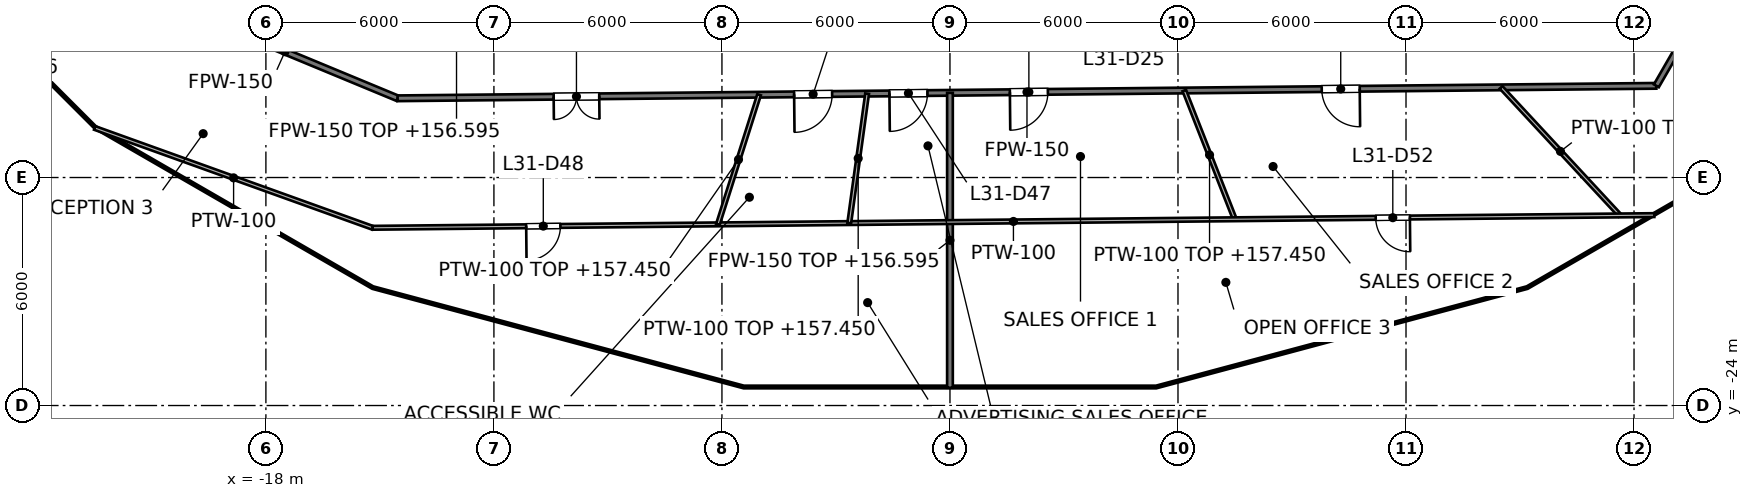
"""IFC4 building model, lengths in metres.
Left out: names, types, materials, properties, quantities, classifications, styles, units other than length and angle.
Written with IfcOpenShell. Run it as: python <this file> out.ifc"""

import sys

from ifc_helpers import new_model, si_unit, direction, frame, frame_2d, origin, place, context, subcontext, project, spatial, rectangle, extrude, element, fill, save


model = new_model("IFC4")
c1 = context("Model", 3, precision=1e-05, world=origin(), true_north=direction((0.0, 1.0)))
c2 = subcontext(c1, "Body", "Model", "MODEL_VIEW")
j1 = project(units=[si_unit("LENGTHUNIT", "METRE"), si_unit("PLANEANGLEUNIT", "RADIAN")], contexts=[c1])
p1 = place(None, origin())
s1 = spatial("IfcSite", under=j1, at=p1, CompositionType="ELEMENT")
p2 = place(p1, origin())
s2 = spatial("IfcBuilding", under=s1, at=p2, CompositionType="ELEMENT")
p3 = place(p2, frame((0.0, 0.0, 153.6)))
s3 = spatial("IfcBuildingStorey", under=s2, at=p3, CompositionType="ELEMENT", Elevation=153.6)
p4 = place(p3, frame((-20.46, -13.46, 0.0), z_axis=(0.0, 0.0, 1.0), x_axis=(0.923801547606, -0.382871650349, 0.0)))
e1 = element("IfcWall", 1, at=p4, inside=s3, PredefinedType="PARTITIONING", context=c2, shape_type="SweptSolid", body=[
    extrude(rectangle(XDim=6.415, YDim=0.15, at=frame_2d((3.208, 0.0))), origin(), (0.0, 0.0, 1.0), 2.927),
])
p5 = place(p3, frame((-14.534, -15.915, 0.0), z_axis=(0.0, 0.0, 1.0), x_axis=(0.999950930262, 0.009906415532, 0.0)))
e2 = element("IfcWall", 2, at=p5, inside=s3, PredefinedType="PARTITIONING", context=c2, shape_type="SweptSolid", body=[
    extrude(rectangle(XDim=33.123, YDim=0.15, at=frame_2d((16.561, 0.0))), origin(), (0.0, 0.0, 1.0), 2.927),
])
p6 = place(p5, frame((4.106, 0.0, 0.0)))
e3 = element("IfcOpeningElement", 3, at=p6, cuts=e2, PredefinedType="OPENING", context=c2, shape_type="SweptSolid", body=[
    extrude(rectangle(XDim=1.2, YDim=2.1, at=frame_2d((0.6, 1.05))), frame((0.0, 0.075, 0.0), z_axis=(0.0, -1.0, 0.0), x_axis=(1.0, 0.0, 0.0)), (0.0, 0.0, 1.0), 0.15),
])
p7 = place(p5, frame((10.434, 0.0, 0.0)))
e4 = element("IfcOpeningElement", 4, at=p7, cuts=e2, PredefinedType="OPENING", context=c2, shape_type="SweptSolid", body=[
    extrude(rectangle(XDim=1.0, YDim=2.1, at=frame_2d((0.5, 1.05))), frame((0.0, 0.075, 0.0), z_axis=(0.0, -1.0, 0.0), x_axis=(1.0, 0.0, 0.0)), (0.0, 0.0, 1.0), 0.15),
])
p8 = place(p5, frame((12.942, 0.0, 0.0)))
e5 = element("IfcOpeningElement", 5, at=p8, cuts=e2, PredefinedType="OPENING", context=c2, shape_type="SweptSolid", body=[
    extrude(rectangle(XDim=1.0, YDim=2.1, at=frame_2d((0.5, 1.05))), frame((0.0, 0.075, 0.0), z_axis=(0.0, -1.0, 0.0), x_axis=(1.0, 0.0, 0.0)), (0.0, 0.0, 1.0), 0.15),
])
p9 = place(p5, frame((16.111, 0.0, 0.0)))
e6 = element("IfcOpeningElement", 6, at=p9, cuts=e2, PredefinedType="OPENING", context=c2, shape_type="SweptSolid", body=[
    extrude(rectangle(XDim=1.0, YDim=2.1, at=frame_2d((0.5, 1.05))), frame((0.0, 0.075, 0.0), z_axis=(0.0, -1.0, 0.0), x_axis=(1.0, 0.0, 0.0)), (0.0, 0.0, 1.0), 0.15),
])
p10 = place(p5, frame((24.318, 0.0, 0.0)))
e7 = element("IfcOpeningElement", 7, at=p10, cuts=e2, PredefinedType="OPENING", context=c2, shape_type="SweptSolid", body=[
    extrude(rectangle(XDim=1.0, YDim=2.1, at=frame_2d((0.5, 1.05))), frame((0.0, 0.075, 0.0), z_axis=(0.0, -1.0, 0.0), x_axis=(1.0, 0.0, 0.0)), (0.0, 0.0, 1.0), 0.15),
])
p11 = place(p3, frame((18.587, -15.587, 0.0), z_axis=(0.0, 0.0, 1.0), x_axis=(0.500005419212, 0.866022274979, 0.0)))
e8 = element("IfcWall", 8, at=p11, inside=s3, PredefinedType="PARTITIONING", context=c2, shape_type="SweptSolid", body=[
    extrude(rectangle(XDim=8.713, YDim=0.15, at=frame_2d((4.357, 0.0))), origin(), (0.0, 0.0, 1.0), 2.927),
])
p12 = place(p11, frame((3.808, 0.0, 0.0)))
e9 = element("IfcOpeningElement", 9, at=p12, cuts=e8, PredefinedType="OPENING", context=c2, shape_type="SweptSolid", body=[
    extrude(rectangle(XDim=1.0, YDim=2.1, at=frame_2d((0.5, 1.05))), frame((0.0, 0.075, 0.0), z_axis=(0.0, -1.0, 0.0), x_axis=(1.0, 0.0, 0.0)), (0.0, 0.0, 1.0), 0.15),
])
p13 = place(p3, frame((0.0, -23.532, 0.0), z_axis=(0.0, 0.0, 1.0), x_axis=(0.0, 1.0, 0.0)))
e10 = element("IfcWall", 10, at=p13, inside=s3, PredefinedType="PARTITIONING", context=c2, shape_type="SweptSolid", body=[
    extrude(rectangle(XDim=7.76, YDim=0.15, at=frame_2d((3.88, 0.0))), origin(), (0.0, 0.0, 1.0), 2.995),
])
p14 = place(p3, frame((6.166, -15.711, 0.0), z_axis=(0.0, 0.0, 1.0), x_axis=(0.365297341245, -0.930890891823, 0.0)))
e11 = element("IfcWall", 11, at=p14, inside=s3, PredefinedType="PARTITIONING", context=c2, shape_type="SweptSolid", body=[
    extrude(rectangle(XDim=3.638, YDim=0.1, at=frame_2d((1.819, 0.0))), origin(), (0.0, 0.0, 1.0), 3.85),
])
p15 = place(p3, frame((14.501, -15.628, 0.0), z_axis=(0.0, 0.0, 1.0), x_axis=(0.680157643832, -0.73306587667, 0.0)))
e12 = element("IfcWall", 12, at=p15, inside=s3, PredefinedType="PARTITIONING", context=c2, shape_type="SweptSolid", body=[
    extrude(rectangle(XDim=4.596, YDim=0.1, at=frame_2d((2.298, 0.0))), origin(), (0.0, 0.0, 1.0), 3.85),
])
p16 = place(p3, frame((-22.506, -16.695, 0.0), z_axis=(0.0, 0.0, 1.0), x_axis=(0.941067528236, -0.338218727009, 0.0)))
e13 = element("IfcWall", 13, at=p16, inside=s3, PredefinedType="PARTITIONING", context=c2, shape_type="SweptSolid", body=[
    extrude(rectangle(XDim=7.77, YDim=0.1, at=frame_2d((3.885, 0.0))), origin(), (0.0, 0.0, 1.0), 2.927),
])
p17 = place(p3, frame((-15.194, -19.323, 0.0), z_axis=(0.0, 0.0, 1.0), x_axis=(0.999950976029, 0.009901794681, 0.0)))
e14 = element("IfcWall", 14, at=p17, inside=s3, PredefinedType="PARTITIONING", context=c2, shape_type="SweptSolid", body=[
    extrude(rectangle(XDim=33.73, YDim=0.1, at=frame_2d((16.865, 0.0))), origin(), (0.0, 0.0, 1.0), 2.927),
])
p18 = place(p17, frame((4.043, 0.0, 0.0)))
e15 = element("IfcOpeningElement", 15, at=p18, cuts=e14, PredefinedType="OPENING", context=c2, shape_type="SweptSolid", body=[
    extrude(rectangle(XDim=0.9, YDim=2.1, at=frame_2d((0.45, 1.05))), frame((0.0, 0.05, 0.0), z_axis=(0.0, -1.0, 0.0), x_axis=(1.0, 0.0, 0.0)), (0.0, 0.0, 1.0), 0.1),
])
p19 = place(p17, frame((26.398, 0.0, 0.0)))
e16 = element("IfcOpeningElement", 16, at=p19, cuts=e14, PredefinedType="OPENING", context=c2, shape_type="SweptSolid", body=[
    extrude(rectangle(XDim=0.9, YDim=2.1, at=frame_2d((0.45, 1.05))), frame((0.0, 0.05, 0.0), z_axis=(0.0, -1.0, 0.0), x_axis=(1.0, 0.0, 0.0)), (0.0, 0.0, 1.0), 0.1),
])
p20 = place(p3, frame((-6.106, -19.233, 0.0), z_axis=(0.0, 0.0, 1.0), x_axis=(0.302626350856, 0.95310927588, 0.0)))
e17 = element("IfcWall", 17, at=p20, inside=s3, PredefinedType="PARTITIONING", context=c2, shape_type="SweptSolid", body=[
    extrude(rectangle(XDim=3.579, YDim=0.1, at=frame_2d((1.789, 0.0))), origin(), (0.0, 0.0, 1.0), 3.85),
])
p21 = place(p3, frame((-2.65, -19.198, 0.0), z_axis=(0.0, 0.0, 1.0), x_axis=(0.136764815741, 0.990603545913, 0.0)))
e18 = element("IfcWall", 18, at=p21, inside=s3, PredefinedType="PARTITIONING", context=c2, shape_type="SweptSolid", body=[
    extrude(rectangle(XDim=3.436, YDim=0.1, at=frame_2d((1.718, 0.0))), origin(), (0.0, 0.0, 1.0), 3.85),
])
p22 = place(p6, origin())
e19 = element("IfcDoor", 19, at=p22, inside=s3, OperationType="DOUBLE_DOOR_SINGLE_SWING", PredefinedType="DOOR", context=c2, shape_type="SweptSolid", body=[
    extrude(rectangle(XDim=1.2, YDim=2.1, at=frame_2d((0.6, 1.05))), frame((0.0, 0.025, 0.0), z_axis=(0.0, -1.0, 0.0), x_axis=(1.0, 0.0, 0.0)), (0.0, 0.0, 1.0), 0.05),
])
fill(e3, e19)
p23 = place(p7, origin())
e20 = element("IfcDoor", 20, at=p23, inside=s3, OperationType="SINGLE_SWING_LEFT", PredefinedType="DOOR", context=c2, shape_type="SweptSolid", body=[
    extrude(rectangle(XDim=1.0, YDim=2.1, at=frame_2d((0.5, 1.05))), frame((0.0, 0.025, 0.0), z_axis=(0.0, -1.0, 0.0), x_axis=(1.0, 0.0, 0.0)), (0.0, 0.0, 1.0), 0.05),
])
fill(e4, e20)
p24 = place(p8, origin())
e21 = element("IfcDoor", 21, at=p24, inside=s3, OperationType="SINGLE_SWING_LEFT", PredefinedType="DOOR", context=c2, shape_type="SweptSolid", body=[
    extrude(rectangle(XDim=1.0, YDim=2.1, at=frame_2d((0.5, 1.05))), frame((0.0, 0.025, 0.0), z_axis=(0.0, -1.0, 0.0), x_axis=(1.0, 0.0, 0.0)), (0.0, 0.0, 1.0), 0.05),
])
fill(e5, e21)
p25 = place(p18, origin())
e22 = element("IfcDoor", 22, at=p25, inside=s3, OperationType="SINGLE_SWING_LEFT", PredefinedType="DOOR", context=c2, shape_type="SweptSolid", body=[
    extrude(rectangle(XDim=0.9, YDim=2.1, at=frame_2d((0.45, 1.05))), frame((0.0, 0.025, 0.0), z_axis=(0.0, -1.0, 0.0), x_axis=(1.0, 0.0, 0.0)), (0.0, 0.0, 1.0), 0.05),
])
fill(e15, e22)
p26 = place(p9, origin())
e23 = element("IfcDoor", 23, at=p26, inside=s3, OperationType="SINGLE_SWING_LEFT", PredefinedType="DOOR", context=c2, shape_type="SweptSolid", body=[
    extrude(rectangle(XDim=1.0, YDim=2.1, at=frame_2d((0.5, 1.05))), frame((0.0, 0.025, 0.0), z_axis=(0.0, -1.0, 0.0), x_axis=(1.0, 0.0, 0.0)), (0.0, 0.0, 1.0), 0.05),
])
fill(e6, e23)
p27 = place(p10, origin())
e24 = element("IfcDoor", 24, at=p27, inside=s3, OperationType="SINGLE_SWING_RIGHT", PredefinedType="DOOR", context=c2, shape_type="SweptSolid", body=[
    extrude(rectangle(XDim=1.0, YDim=2.1, at=frame_2d((0.5, 1.05))), frame((0.0, 0.025, 0.0), z_axis=(0.0, -1.0, 0.0), x_axis=(1.0, 0.0, 0.0)), (0.0, 0.0, 1.0), 0.05),
])
fill(e7, e24)
p28 = place(p19, origin())
e25 = element("IfcDoor", 25, at=p28, inside=s3, OperationType="SINGLE_SWING_RIGHT", PredefinedType="DOOR", context=c2, shape_type="SweptSolid", body=[
    extrude(rectangle(XDim=0.9, YDim=2.1, at=frame_2d((0.45, 1.05))), frame((0.0, 0.025, 0.0), z_axis=(0.0, -1.0, 0.0), x_axis=(1.0, 0.0, 0.0)), (0.0, 0.0, 1.0), 0.05),
])
fill(e16, e25)
save(model, sys.argv[1])
